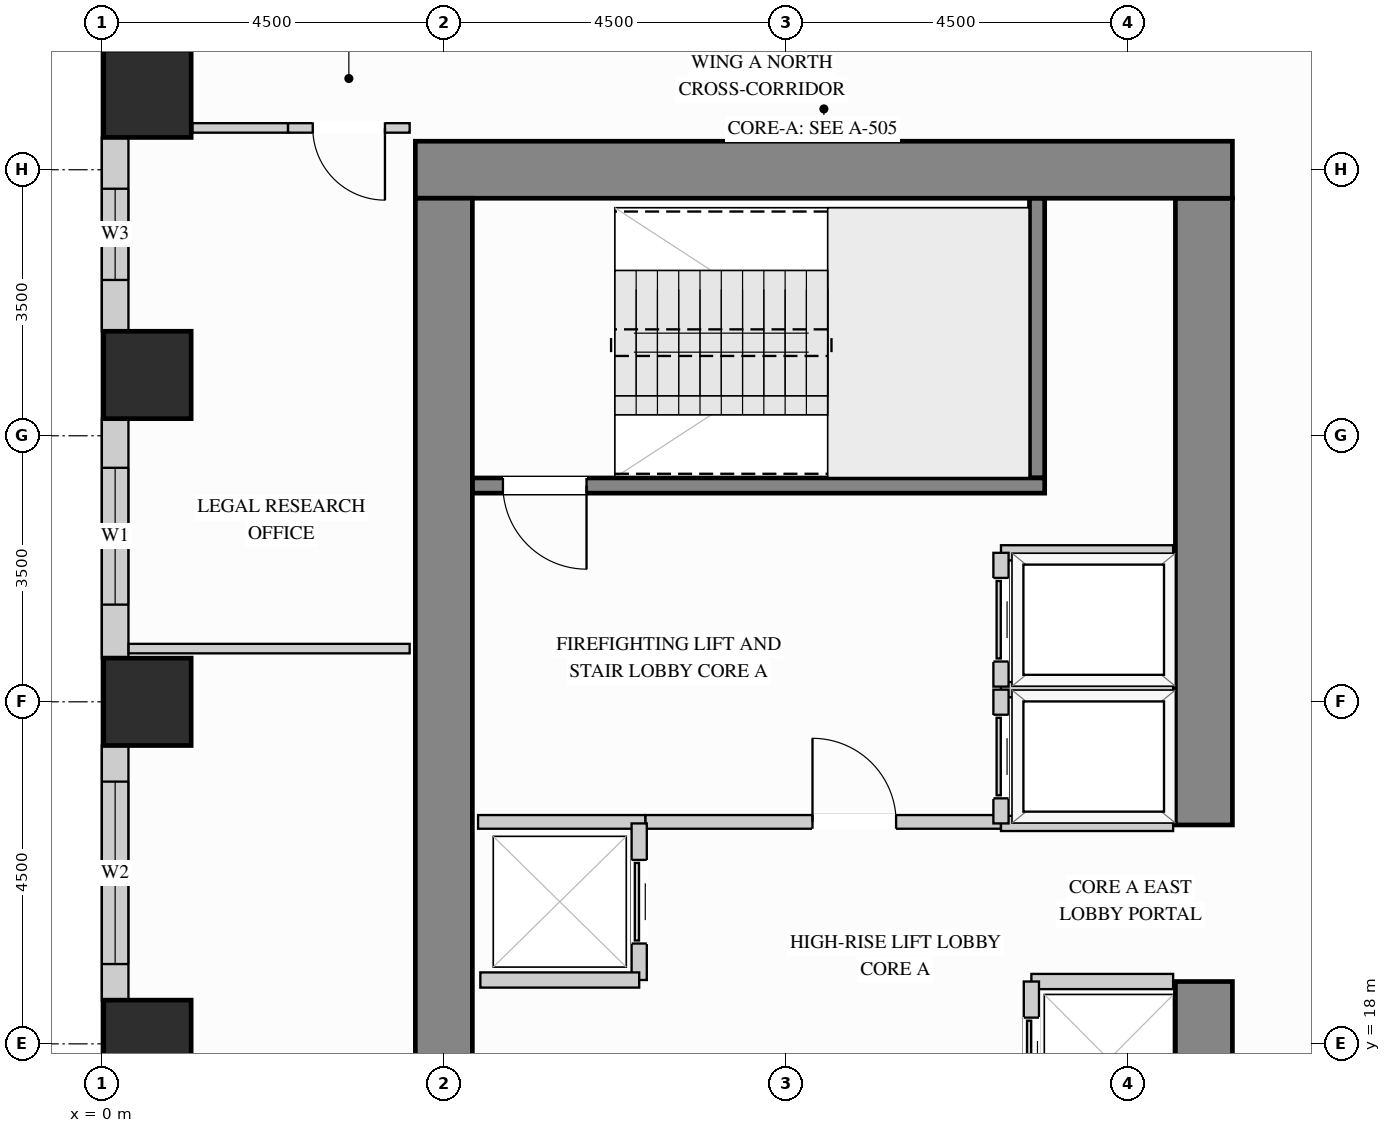
"""IFC4 building model, lengths in metres.
Left out: names, types, materials, properties, quantities, classifications, styles, units other than length and angle.
Written with IfcOpenShell. Run it as: python <this file> out.ifc"""

import sys

from ifc_helpers import new_model, si_unit, direction, frame, frame_2d, origin, origin_2d, place, context, subcontext, project, spatial, rectangle, extrude, source, transform, mapped, element, fill, save


model = new_model("IFC4")
c1 = context("Model", 3, precision=1e-05, world=origin(), true_north=direction((0.0, 1.0)))
c2 = subcontext(c1, "Body", "Model", "MODEL_VIEW")
j1 = project(units=[si_unit("LENGTHUNIT", "METRE"), si_unit("PLANEANGLEUNIT", "RADIAN")], contexts=[c1])
p1 = place(None, origin())
s1 = spatial("IfcSite", under=j1, at=p1, CompositionType="ELEMENT")
p2 = place(p1, origin())
s2 = spatial("IfcBuilding", under=s1, at=p2, CompositionType="ELEMENT")
p3 = place(p2, frame((0.0, 0.0, 113.4)))
s3 = spatial("IfcBuildingStorey", under=s2, at=p3, CompositionType="ELEMENT", Elevation=113.4)
m1 = source(origin(), c2, "Body", "SweptSolid", [
    extrude(rectangle(XDim=1.15, YDim=1.15, at=origin_2d()), origin(), (0.0, 0.0, 1.0), 3.38),
])
for number, where, z_axis, x_axis in (
    (1, (0.6, 18.0, 0.0), (0.0, 0.0, 1.0), (1.0, 0.0, 0.0)),
    (2, (0.6, 22.5, 0.0), (0.0, 0.0, 1.0), (1.0, 0.0, 0.0)),
    (3, (0.6, 26.8, 0.0), (0.0, 0.0, 1.0), (1.0, 0.0, 0.0)),
    (4, (0.6, 30.5, 0.0), (0.0, 0.0, 1.0), (1.0, 0.0, 0.0)),
):
    element("IfcColumn", number, at=place(p3, frame(where, z_axis=z_axis, x_axis=x_axis)), inside=s3, PredefinedType="COLUMN", context=c2, shape_type="MappedRepresentation", body=[
        mapped(m1, transform((0.0, 0.0, 0.0), x_axis=(1.0, 0.0, 0.0), y_axis=(0.0, 1.0, 0.0), z_axis=(0.0, 0.0, 1.0))),
    ])
m2 = source(origin(), c2, "Body", "SweptSolid", [
    extrude(rectangle(XDim=9.945, YDim=0.75, at=frame_2d((4.973, 0.0))), origin(), (0.0, 0.0, 1.0), 3.38),
])
p4 = place(p3, frame((14.5, 8.875, 0.0), z_axis=(0.0, 0.0, 1.0), x_axis=(0.0, 1.0, 0.0)))
e5 = element("IfcWall", 5, at=p4, inside=s3, PredefinedType="SHEAR", context=c2, shape_type="MappedRepresentation", body=[
    mapped(m2, transform((0.0, 0.0, 0.0), x_axis=(1.0, 0.0, 0.0), y_axis=(0.0, 1.0, 0.0), z_axis=(0.0, 0.0, 1.0))),
])
m3 = source(origin(), c2, "Body", "SweptSolid", [
    extrude(rectangle(XDim=8.245, YDim=0.75, at=frame_2d((4.123, 0.0))), origin(), (0.0, 0.0, 1.0), 3.38),
])
p5 = place(p3, frame((14.5, 20.88, 0.0), z_axis=(0.0, 0.0, 1.0), x_axis=(0.0, 1.0, 0.0)))
e6 = element("IfcWall", 6, at=p5, inside=s3, PredefinedType="SHEAR", context=c2, shape_type="MappedRepresentation", body=[
    mapped(m3, transform((0.0, 0.0, 0.0), x_axis=(1.0, 0.0, 0.0), y_axis=(0.0, 1.0, 0.0), z_axis=(0.0, 0.0, 1.0))),
])
m4 = source(origin(), c2, "Body", "SweptSolid", [
    extrude(rectangle(XDim=10.75, YDim=0.75, at=frame_2d((5.375, 0.0))), origin(), (0.0, 0.0, 1.0), 3.38),
])
p6 = place(p3, frame((4.125, 29.5, 0.0), z_axis=(0.0, 0.0, 1.0), x_axis=(1.0, 0.0, 0.0)))
e7 = element("IfcWall", 7, at=p6, inside=s3, PredefinedType="SHEAR", context=c2, shape_type="MappedRepresentation", body=[
    mapped(m4, transform((0.0, 0.0, 0.0), x_axis=(1.0, 0.0, 0.0), y_axis=(0.0, 1.0, 0.0), z_axis=(0.0, 0.0, 1.0))),
])
m5 = source(origin(), c2, "Body", "SweptSolid", [
    extrude(rectangle(XDim=20.25, YDim=0.75, at=frame_2d((10.125, 0.0))), origin(), (0.0, 0.0, 1.0), 3.38),
])
p7 = place(p3, frame((4.5, 8.875, 0.0), z_axis=(0.0, 0.0, 1.0), x_axis=(0.0, 1.0, 0.0)))
e8 = element("IfcWall", 8, at=p7, inside=s3, PredefinedType="SHEAR", context=c2, shape_type="MappedRepresentation", body=[
    mapped(m5, transform((0.0, 0.0, 0.0), x_axis=(1.0, 0.0, 0.0), y_axis=(0.0, 1.0, 0.0), z_axis=(0.0, 0.0, 1.0))),
])
p8 = place(p3, frame((0.175, 29.927, 0.0), z_axis=(0.0, 0.0, 1.0), x_axis=(0.0, -1.0, 0.0)))
e9 = element("IfcWall", 9, at=p8, inside=s3, PredefinedType="SOLIDWALL", context=c2, shape_type="SweptSolid", body=[
    extrude(rectangle(XDim=2.554, YDim=0.35, at=frame_2d((1.277, 0.0))), origin(), (0.0, 0.0, 1.0), 3.365),
])
p9 = place(p8, frame((0.677, 0.0, 0.78)))
e10 = element("IfcOpeningElement", 10, at=p9, cuts=e9, PredefinedType="OPENING", context=c2, shape_type="SweptSolid", body=[
    extrude(rectangle(XDim=1.2, YDim=2.1, at=frame_2d((0.6, 1.05))), frame((0.0, 0.185, 0.0), z_axis=(0.0, -1.0, 0.0), x_axis=(1.0, 0.0, 0.0)), (0.0, 0.0, 1.0), 0.37),
])
p10 = place(p3, frame((0.175, 26.227, 0.0), z_axis=(0.0, 0.0, 1.0), x_axis=(0.0, -1.0, 0.0)))
e11 = element("IfcWall", 11, at=p10, inside=s3, PredefinedType="SOLIDWALL", context=c2, shape_type="SweptSolid", body=[
    extrude(rectangle(XDim=3.154, YDim=0.35, at=frame_2d((1.577, 0.0))), origin(), (0.0, 0.0, 1.0), 3.365),
])
p11 = place(p10, frame((0.648, 0.0, 0.78)))
e12 = element("IfcOpeningElement", 12, at=p11, cuts=e11, PredefinedType="OPENING", context=c2, shape_type="SweptSolid", body=[
    extrude(rectangle(XDim=1.8, YDim=2.1, at=frame_2d((0.9, 1.05))), frame((0.0, 0.185, 0.0), z_axis=(0.0, -1.0, 0.0), x_axis=(1.0, 0.0, 0.0)), (0.0, 0.0, 1.0), 0.37),
])
p12 = place(p3, frame((0.175, 21.927, 0.0), z_axis=(0.0, 0.0, 1.0), x_axis=(0.0, -1.0, 0.0)))
e13 = element("IfcWall", 13, at=p12, inside=s3, PredefinedType="SOLIDWALL", context=c2, shape_type="SweptSolid", body=[
    extrude(rectangle(XDim=3.354, YDim=0.35, at=frame_2d((1.677, 0.0))), origin(), (0.0, 0.0, 1.0), 3.365),
])
p13 = place(p12, frame((0.477, 0.0, 0.78)))
e14 = element("IfcOpeningElement", 14, at=p13, cuts=e13, PredefinedType="OPENING", context=c2, shape_type="SweptSolid", body=[
    extrude(rectangle(XDim=2.4, YDim=2.1, at=frame_2d((1.2, 1.05))), frame((0.0, 0.185, 0.0), z_axis=(0.0, -1.0, 0.0), x_axis=(1.0, 0.0, 0.0)), (0.0, 0.0, 1.0), 0.37),
])
p14 = place(p3, frame((7.15, 20.92, 0.0), z_axis=(0.0, 0.0, 1.0), x_axis=(1.0, 0.0, 0.0)))
e15 = element("IfcWall", 15, at=p14, inside=s3, PredefinedType="PARTITIONING", context=c2, shape_type="SweptSolid", body=[
    extrude(rectangle(XDim=4.68, YDim=0.18, at=frame_2d((2.34, 0.0))), origin(), (0.0, 0.0, 1.0), 3.365),
])
p15 = place(p14, frame((2.2, 0.0, 0.0)))
e16 = element("IfcOpeningElement", 16, at=p15, cuts=e15, PredefinedType="OPENING", context=c2, shape_type="SweptSolid", body=[
    extrude(rectangle(XDim=1.1, YDim=2.15, at=frame_2d((0.55, 1.075))), frame((0.0, 0.1, 0.0), z_axis=(0.0, -1.0, 0.0), x_axis=(1.0, 0.0, 0.0)), (0.0, 0.0, 1.0), 0.2),
])
m6 = source(origin(), c2, "Body", "SweptSolid", [
    extrude(rectangle(XDim=2.2, YDim=0.18, at=frame_2d((1.1, 0.0))), origin(), (0.0, 0.0, 1.0), 3.365),
])
p16 = place(p3, frame((4.95, 20.92, 0.0), z_axis=(0.0, 0.0, 1.0), x_axis=(1.0, 0.0, 0.0)))
e17 = element("IfcWall", 17, at=p16, inside=s3, PredefinedType="PARTITIONING", context=c2, shape_type="MappedRepresentation", body=[
    mapped(m6, transform((0.0, 0.0, 0.0), x_axis=(1.0, 0.0, 0.0), y_axis=(0.0, 1.0, 0.0), z_axis=(0.0, 0.0, 1.0))),
])
m7 = source(origin(), c2, "Body", "SweptSolid", [
    extrude(rectangle(XDim=1.26, YDim=0.125, at=frame_2d((0.63, 0.0))), origin(), (0.0, 0.0, 1.0), 3.365),
])
p17 = place(p3, frame((1.19, 30.05, 0.0), z_axis=(0.0, 0.0, 1.0), x_axis=(1.0, 0.0, 0.0)))
e18 = element("IfcWall", 18, at=p17, inside=s3, PredefinedType="PARTITIONING", context=c2, shape_type="MappedRepresentation", body=[
    mapped(m7, transform((0.0, 0.0, 0.0), x_axis=(1.0, 0.0, 0.0), y_axis=(0.0, 1.0, 0.0), z_axis=(0.0, 0.0, 1.0))),
])
p18 = place(p3, frame((2.45, 30.05, 0.0), z_axis=(0.0, 0.0, 1.0), x_axis=(1.0, 0.0, 0.0)))
e19 = element("IfcWall", 19, at=p18, inside=s3, PredefinedType="PARTITIONING", context=c2, shape_type="SweptSolid", body=[
    extrude(rectangle(XDim=1.6, YDim=0.125, at=frame_2d((0.8, 0.0))), origin(), (0.0, 0.0, 1.0), 3.365),
])
p19 = place(p18, frame((0.325, 0.0, 0.0)))
e20 = element("IfcOpeningElement", 20, at=p19, cuts=e19, PredefinedType="OPENING", context=c2, shape_type="SweptSolid", body=[
    extrude(rectangle(XDim=0.95, YDim=2.15, at=frame_2d((0.475, 1.075))), frame((0.0, 0.073, 0.0), z_axis=(0.0, -1.0, 0.0), x_axis=(1.0, 0.0, 0.0)), (0.0, 0.0, 1.0), 0.145),
])
m8 = source(origin(), c2, "Body", "SweptSolid", [
    extrude(rectangle(XDim=3.698, YDim=0.125, at=frame_2d((1.849, 0.0))), origin(), (0.0, 0.0, 1.0), 3.365),
])
p20 = place(p3, frame((0.352, 23.2, 0.0), z_axis=(0.0, 0.0, 1.0), x_axis=(1.0, 0.0, 0.0)))
e21 = element("IfcWall", 21, at=p20, inside=s3, PredefinedType="PARTITIONING", context=c2, shape_type="MappedRepresentation", body=[
    mapped(m8, transform((0.0, 0.0, 0.0), x_axis=(1.0, 0.0, 0.0), y_axis=(0.0, 1.0, 0.0), z_axis=(0.0, 0.0, 1.0))),
])
m9 = source(origin(), c2, "Body", "SweptSolid", [
    extrude(rectangle(XDim=2.265, YDim=0.2, at=frame_2d((1.132, 0.0))), origin(), (0.0, 0.0, 1.0), 3.365),
])
for number, where, z_axis, x_axis in (
    (22, (11.83, 22.66, 0.0), (0.0, 0.0, 1.0), (1.0, 0.0, 0.0)),
    (23, (11.83, 20.9, 0.0), (0.0, 0.0, 1.0), (1.0, 0.0, 0.0)),
):
    element("IfcWall", number, at=place(p3, frame(where, z_axis=z_axis, x_axis=x_axis)), inside=s3, PredefinedType="PARTITIONING", context=c2, shape_type="MappedRepresentation", body=[
        mapped(m9, transform((0.0, 0.0, 0.0), x_axis=(1.0, 0.0, 0.0), y_axis=(0.0, 1.0, 0.0), z_axis=(0.0, 0.0, 1.0))),
    ])
p21 = place(p3, frame((11.83, 20.9, 0.0), z_axis=(0.0, 0.0, 1.0), x_axis=(0.0, 1.0, 0.0)))
e24 = element("IfcWall", 24, at=p21, inside=s3, PredefinedType="PARTITIONING", context=c2, shape_type="SweptSolid", body=[
    extrude(rectangle(XDim=1.76, YDim=0.2, at=frame_2d((0.88, 0.0))), origin(), (0.0, 0.0, 1.0), 3.365),
])
p22 = place(p21, frame((0.33, 0.0, 0.0)))
e25 = element("IfcOpeningElement", 25, at=p22, cuts=e24, PredefinedType="OPENING", context=c2, shape_type="SweptSolid", body=[
    extrude(rectangle(XDim=1.1, YDim=2.2, at=frame_2d((0.55, 1.1))), frame((0.0, 0.11, 0.0), z_axis=(0.0, -1.0, 0.0), x_axis=(1.0, 0.0, 0.0)), (0.0, 0.0, 1.0), 0.22),
])
p23 = place(p3, frame((11.83, 24.46, 0.0), z_axis=(0.0, 0.0, 1.0), x_axis=(1.0, 0.0, 0.0)))
e26 = element("IfcWall", 26, at=p23, inside=s3, PredefinedType="PARTITIONING", context=c2, shape_type="MappedRepresentation", body=[
    mapped(m9, transform((0.0, 0.0, 0.0), x_axis=(1.0, 0.0, 0.0), y_axis=(0.0, 1.0, 0.0), z_axis=(0.0, 0.0, 1.0))),
])
p24 = place(p3, frame((11.83, 22.7, 0.0), z_axis=(0.0, 0.0, 1.0), x_axis=(0.0, 1.0, 0.0)))
e27 = element("IfcWall", 27, at=p24, inside=s3, PredefinedType="PARTITIONING", context=c2, shape_type="SweptSolid", body=[
    extrude(rectangle(XDim=1.76, YDim=0.2, at=frame_2d((0.88, 0.0))), origin(), (0.0, 0.0, 1.0), 3.365),
])
p25 = place(p24, frame((0.33, 0.0, 0.0)))
e28 = element("IfcOpeningElement", 28, at=p25, cuts=e27, PredefinedType="OPENING", context=c2, shape_type="SweptSolid", body=[
    extrude(rectangle(XDim=1.1, YDim=2.2, at=frame_2d((0.55, 1.1))), frame((0.0, 0.11, 0.0), z_axis=(0.0, -1.0, 0.0), x_axis=(1.0, 0.0, 0.0)), (0.0, 0.0, 1.0), 0.22),
])
m10 = source(origin(), c2, "Body", "SweptSolid", [
    extrude(rectangle(XDim=1.865, YDim=0.2, at=frame_2d((0.933, 0.0))), origin(), (0.0, 0.0, 1.0), 3.365),
])
p26 = place(p3, frame((12.23, 18.82, 0.0), z_axis=(0.0, 0.0, 1.0), x_axis=(1.0, 0.0, 0.0)))
e29 = element("IfcWall", 29, at=p26, inside=s3, PredefinedType="PARTITIONING", context=c2, shape_type="MappedRepresentation", body=[
    mapped(m10, transform((0.0, 0.0, 0.0), x_axis=(1.0, 0.0, 0.0), y_axis=(0.0, 1.0, 0.0), z_axis=(0.0, 0.0, 1.0))),
])
p27 = place(p3, frame((12.23, 16.77, 0.0), z_axis=(0.0, 0.0, 1.0), x_axis=(0.0, 1.0, 0.0)))
e30 = element("IfcWall", 30, at=p27, inside=s3, PredefinedType="PARTITIONING", context=c2, shape_type="SweptSolid", body=[
    extrude(rectangle(XDim=2.05, YDim=0.2, at=frame_2d((1.025, 0.0))), origin(), (0.0, 0.0, 1.0), 3.365),
])
p28 = place(p27, frame((0.475, 0.0, 0.0)))
e31 = element("IfcOpeningElement", 31, at=p28, cuts=e30, PredefinedType="OPENING", context=c2, shape_type="SweptSolid", body=[
    extrude(rectangle(XDim=1.1, YDim=2.2, at=frame_2d((0.55, 1.1))), frame((0.0, 0.11, 0.0), z_axis=(0.0, -1.0, 0.0), x_axis=(1.0, 0.0, 0.0)), (0.0, 0.0, 1.0), 0.22),
])
p29 = place(p3, frame((7.07, 18.84, 0.0), z_axis=(0.0, 0.0, 1.0), x_axis=(0.0, 1.0, 0.0)))
e32 = element("IfcWall", 32, at=p29, inside=s3, PredefinedType="PARTITIONING", context=c2, shape_type="SweptSolid", body=[
    extrude(rectangle(XDim=2.06, YDim=0.2, at=frame_2d((1.03, 0.0))), origin(), (0.0, 0.0, 1.0), 3.365),
])
p30 = place(p29, frame((0.48, 0.0, 0.0)))
e33 = element("IfcOpeningElement", 33, at=p30, cuts=e32, PredefinedType="OPENING", context=c2, shape_type="SweptSolid", body=[
    extrude(rectangle(XDim=1.1, YDim=2.2, at=frame_2d((0.55, 1.1))), frame((0.0, 0.11, 0.0), z_axis=(0.0, -1.0, 0.0), x_axis=(1.0, 0.0, 0.0)), (0.0, 0.0, 1.0), 0.22),
])
m11 = source(origin(), c2, "Body", "SweptSolid", [
    extrude(rectangle(XDim=2.09, YDim=0.2, at=frame_2d((1.045, 0.0))), origin(), (0.0, 0.0, 1.0), 3.365),
])
p31 = place(p3, frame((4.98, 18.84, 0.0), z_axis=(0.0, 0.0, 1.0), x_axis=(1.0, 0.0, 0.0)))
e34 = element("IfcWall", 34, at=p31, inside=s3, PredefinedType="PARTITIONING", context=c2, shape_type="MappedRepresentation", body=[
    mapped(m11, transform((0.0, 0.0, 0.0), x_axis=(1.0, 0.0, 0.0), y_axis=(0.0, 1.0, 0.0), z_axis=(0.0, 0.0, 1.0))),
])
m12 = source(origin(), c2, "Body", "SweptSolid", [
    extrude(rectangle(XDim=3.678, YDim=0.2, at=frame_2d((1.839, 0.0))), origin(), (0.0, 0.0, 1.0), 3.38),
])
p32 = place(p3, frame((12.305, 25.445, 0.0), z_axis=(0.0, 0.0, 1.0), x_axis=(0.0, 1.0, 0.0)))
e35 = element("IfcWall", 35, at=p32, inside=s3, PredefinedType="SHEAR", context=c2, shape_type="MappedRepresentation", body=[
    mapped(m12, transform((0.0, 0.0, 0.0), x_axis=(1.0, 0.0, 0.0), y_axis=(0.0, 1.0, 0.0), z_axis=(0.0, 0.0, 1.0))),
])
p33 = place(p3, frame((4.877, 25.345, 0.0), z_axis=(0.0, 0.0, 1.0), x_axis=(1.0, 0.0, 0.0)))
e36 = element("IfcWall", 36, at=p33, inside=s3, PredefinedType="SHEAR", context=c2, shape_type="SweptSolid", body=[
    extrude(rectangle(XDim=7.528, YDim=0.2, at=frame_2d((3.764, 0.0))), origin(), (0.0, 0.0, 1.0), 3.38),
])
p34 = place(p33, frame((0.4, 0.0, 0.0)))
e37 = element("IfcOpeningElement", 37, at=p34, cuts=e36, PredefinedType="OPENING", context=c2, shape_type="SweptSolid", body=[
    extrude(rectangle(XDim=1.1, YDim=2.15, at=frame_2d((0.55, 1.075))), frame((0.0, 0.11, 0.0), z_axis=(0.0, -1.0, 0.0), x_axis=(1.0, 0.0, 0.0)), (0.0, 0.0, 1.0), 0.22),
])
m13 = source(origin(), c2, "Body", "SweptSolid", [
    extrude(rectangle(XDim=1.1, YDim=2.15, at=frame_2d((0.55, 1.075))), frame((0.0, 0.025, 0.0), z_axis=(0.0, -1.0, 0.0), x_axis=(1.0, 0.0, 0.0)), (0.0, 0.0, 1.0), 0.05),
])
p35 = place(p15, origin())
e38 = element("IfcDoor", 38, at=p35, inside=s3, OperationType="SINGLE_SWING_LEFT", PredefinedType="DOOR", context=c2, shape_type="MappedRepresentation", body=[
    mapped(m13, transform((0.0, 0.0, 0.0), x_axis=(1.0, 0.0, 0.0), y_axis=(0.0, 1.0, 0.0), z_axis=(0.0, 0.0, 1.0))),
])
fill(e16, e38)
m14 = source(origin(), c2, "Body", "SweptSolid", [
    extrude(rectangle(XDim=1.1, YDim=2.2, at=frame_2d((0.55, 1.1))), frame((0.0, 0.025, 0.0), z_axis=(0.0, -1.0, 0.0), x_axis=(1.0, 0.0, 0.0)), (0.0, 0.0, 1.0), 0.05),
])
p36 = place(p22, origin())
e39 = element("IfcDoor", 39, at=p36, inside=s3, OperationType="SLIDING_TO_LEFT", PredefinedType="DOOR", context=c2, shape_type="MappedRepresentation", body=[
    mapped(m14, transform((0.0, 0.0, 0.0), x_axis=(1.0, 0.0, 0.0), y_axis=(0.0, 1.0, 0.0), z_axis=(0.0, 0.0, 1.0))),
])
fill(e25, e39)
p37 = place(p25, origin())
e40 = element("IfcDoor", 40, at=p37, inside=s3, OperationType="SLIDING_TO_LEFT", PredefinedType="DOOR", context=c2, shape_type="MappedRepresentation", body=[
    mapped(m14, transform((0.0, 0.0, 0.0), x_axis=(1.0, 0.0, 0.0), y_axis=(0.0, 1.0, 0.0), z_axis=(0.0, 0.0, 1.0))),
])
fill(e28, e40)
p38 = place(p28, origin())
e41 = element("IfcDoor", 41, at=p38, inside=s3, OperationType="SLIDING_TO_LEFT", PredefinedType="DOOR", context=c2, shape_type="MappedRepresentation", body=[
    mapped(m14, transform((0.0, 0.0, 0.0), x_axis=(1.0, 0.0, 0.0), y_axis=(0.0, 1.0, 0.0), z_axis=(0.0, 0.0, 1.0))),
])
fill(e31, e41)
p39 = place(p30, origin())
e42 = element("IfcDoor", 42, at=p39, inside=s3, OperationType="SLIDING_TO_LEFT", PredefinedType="DOOR", context=c2, shape_type="MappedRepresentation", body=[
    mapped(m14, transform((0.0, 0.0, 0.0), x_axis=(1.0, 0.0, 0.0), y_axis=(0.0, 1.0, 0.0), z_axis=(0.0, 0.0, 1.0))),
])
fill(e33, e42)
m15 = source(origin(), c2, "Body", "SweptSolid", [
    extrude(rectangle(XDim=0.95, YDim=2.15, at=frame_2d((0.475, 1.075))), frame((0.0, 0.025, 0.0), z_axis=(0.0, -1.0, 0.0), x_axis=(1.0, 0.0, 0.0)), (0.0, 0.0, 1.0), 0.05),
])
p40 = place(p19, origin())
e43 = element("IfcDoor", 43, at=p40, inside=s3, OperationType="SINGLE_SWING_RIGHT", PredefinedType="DOOR", context=c2, shape_type="MappedRepresentation", body=[
    mapped(m15, transform((0.0, 0.0, 0.0), x_axis=(1.0, 0.0, 0.0), y_axis=(0.0, 1.0, 0.0), z_axis=(0.0, 0.0, 1.0))),
])
fill(e20, e43)
m16 = source(origin(), c2, "Body", "SweptSolid", [
    extrude(rectangle(XDim=1.1, YDim=2.15, at=frame_2d((0.55, 1.075))), frame((0.0, 0.025, 0.0), z_axis=(0.0, -1.0, 0.0), x_axis=(1.0, 0.0, 0.0)), (0.0, 0.0, 1.0), 0.05),
])
p41 = place(p34, origin())
e44 = element("IfcDoor", 44, at=p41, inside=s3, OperationType="SINGLE_SWING_RIGHT", PredefinedType="DOOR", context=c2, shape_type="MappedRepresentation", body=[
    mapped(m16, transform((0.0, 0.0, 0.0), x_axis=(1.0, 0.0, 0.0), y_axis=(0.0, 1.0, 0.0), z_axis=(0.0, 0.0, 1.0))),
])
fill(e37, e44)
m17 = source(origin(), c2, "Body", "SweptSolid", [
    extrude(rectangle(XDim=1.8, YDim=2.1, at=frame_2d((0.9, 1.05))), frame((0.0, 0.03, 0.0), z_axis=(0.0, -1.0, 0.0), x_axis=(1.0, 0.0, 0.0)), (0.0, 0.0, 1.0), 0.06),
])
p42 = place(p11, origin())
e45 = element("IfcWindow", 45, at=p42, inside=s3, PartitioningType="SINGLE_PANEL", PredefinedType="WINDOW", context=c2, shape_type="MappedRepresentation", body=[
    mapped(m17, transform((0.0, 0.0, 0.0), x_axis=(1.0, 0.0, 0.0), y_axis=(0.0, 1.0, 0.0), z_axis=(0.0, 0.0, 1.0))),
])
fill(e12, e45)
m18 = source(origin(), c2, "Body", "SweptSolid", [
    extrude(rectangle(XDim=2.4, YDim=2.1, at=frame_2d((1.2, 1.05))), frame((0.0, 0.03, 0.0), z_axis=(0.0, -1.0, 0.0), x_axis=(1.0, 0.0, 0.0)), (0.0, 0.0, 1.0), 0.06),
])
p43 = place(p13, origin())
e46 = element("IfcWindow", 46, at=p43, inside=s3, PartitioningType="SINGLE_PANEL", PredefinedType="WINDOW", context=c2, shape_type="MappedRepresentation", body=[
    mapped(m18, transform((0.0, 0.0, 0.0), x_axis=(1.0, 0.0, 0.0), y_axis=(0.0, 1.0, 0.0), z_axis=(0.0, 0.0, 1.0))),
])
fill(e14, e46)
m19 = source(origin(), c2, "Body", "SweptSolid", [
    extrude(rectangle(XDim=1.2, YDim=2.1, at=frame_2d((0.6, 1.05))), frame((0.0, 0.03, 0.0), z_axis=(0.0, -1.0, 0.0), x_axis=(1.0, 0.0, 0.0)), (0.0, 0.0, 1.0), 0.06),
])
p44 = place(p9, origin())
e47 = element("IfcWindow", 47, at=p44, inside=s3, PartitioningType="SINGLE_PANEL", PredefinedType="WINDOW", context=c2, shape_type="MappedRepresentation", body=[
    mapped(m19, transform((0.0, 0.0, 0.0), x_axis=(1.0, 0.0, 0.0), y_axis=(0.0, 1.0, 0.0), z_axis=(0.0, 0.0, 1.0))),
])
fill(e10, e47)
save(model, sys.argv[1])
